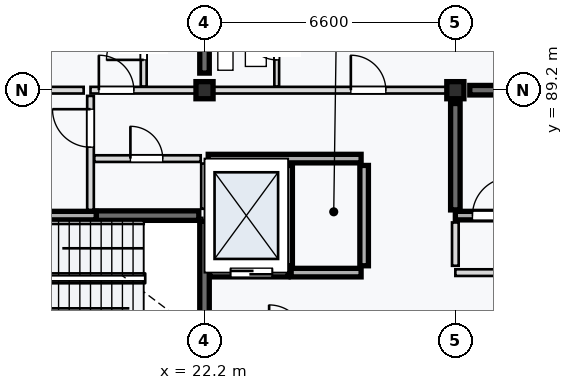
"""IFC4 building model, lengths in metres.
Left out: names, types, materials, properties, quantities, classifications, styles, units other than length and angle.
Written with IfcOpenShell. Run it as: python <this file> out.ifc"""

import sys

from ifc_helpers import new_model, si_unit, direction, frame, frame_2d, origin, origin_2d, place, context, subcontext, project, spatial, rectangle, extrude, element, fill, save


model = new_model("IFC4")
c1 = context("Model", 3, precision=1e-05, world=origin(), true_north=direction((0.0, 1.0)))
c2 = subcontext(c1, "Body", "Model", "MODEL_VIEW")
j1 = project(units=[si_unit("LENGTHUNIT", "METRE"), si_unit("PLANEANGLEUNIT", "RADIAN")], contexts=[c1])
p1 = place(None, origin())
s1 = spatial("IfcSite", under=j1, at=p1, CompositionType="ELEMENT")
p2 = place(p1, origin())
s2 = spatial("IfcBuilding", under=s1, at=p2, CompositionType="ELEMENT")
p3 = place(p2, frame((0.0, 0.0, 43.6)))
s3 = spatial("IfcBuildingStorey", under=s2, at=p3, CompositionType="ELEMENT", Elevation=43.6)
for number, where, z_axis, x_axis in (
    (1, (22.2, 89.2, 0.0), (0.0, 0.0, 1.0), (1.0, 0.0, 0.0)),
    (2, (28.8, 89.2, 0.0), (0.0, 0.0, 1.0), (1.0, 0.0, 0.0)),
):
    element("IfcColumn", number, at=place(p3, frame(where, z_axis=z_axis, x_axis=x_axis)), inside=s3, PredefinedType="COLUMN", context=c2, shape_type="SweptSolid", body=[
        extrude(rectangle(XDim=0.45, YDim=0.45, at=origin_2d()), origin(), (0.0, 0.0, 1.0), 3.2),
    ])
p4 = place(p3, frame((19.35, 85.9, 0.0), z_axis=(0.0, 0.0, 1.0), x_axis=(1.0, 0.0, 0.0)))
e3 = element("IfcWall", 3, at=p4, inside=s3, PredefinedType="SHEAR", context=c2, shape_type="SweptSolid", body=[
    extrude(rectangle(XDim=2.7, YDim=0.25, at=frame_2d((1.35, 0.0))), origin(), (0.0, 0.0, 1.0), 2.98),
])
p5 = place(p3, frame((22.2, 82.95, 0.0), z_axis=(0.0, 0.0, 1.0), x_axis=(0.0, 1.0, 0.0)))
e4 = element("IfcWall", 4, at=p5, inside=s3, PredefinedType="SHEAR", context=c2, shape_type="SweptSolid", body=[
    extrude(rectangle(XDim=2.8, YDim=0.25, at=frame_2d((1.4, 0.0))), origin(), (0.0, 0.0, 1.0), 2.98),
])
p6 = place(p3, frame((29.18, 89.2, 0.0), z_axis=(0.0, 0.0, 1.0), x_axis=(1.0, 0.0, 0.0)))
e5 = element("IfcWall", 5, at=p6, inside=s3, PredefinedType="SHEAR", context=c2, shape_type="SweptSolid", body=[
    extrude(rectangle(XDim=5.84, YDim=0.25, at=frame_2d((2.92, 0.0))), origin(), (0.0, 0.0, 1.0), 2.98),
])
p7 = place(p3, frame((28.8, 86.05, 0.0), z_axis=(0.0, 0.0, 1.0), x_axis=(0.0, 1.0, 0.0)))
e6 = element("IfcWall", 6, at=p7, inside=s3, PredefinedType="SHEAR", context=c2, shape_type="SweptSolid", body=[
    extrude(rectangle(XDim=2.8, YDim=0.25, at=frame_2d((1.4, 0.0))), origin(), (0.0, 0.0, 1.0), 2.98),
])
p8 = place(p3, frame((22.2, 89.65, 0.0), z_axis=(0.0, 0.0, 1.0), x_axis=(0.0, 1.0, 0.0)))
e7 = element("IfcWall", 7, at=p8, inside=s3, PredefinedType="SHEAR", context=c2, shape_type="SweptSolid", body=[
    extrude(rectangle(XDim=5.7, YDim=0.25, at=frame_2d((2.85, 0.0))), origin(), (0.0, 0.0, 1.0), 2.98),
])
p9 = place(p3, frame((15.75, 85.9, 0.0), z_axis=(0.0, 0.0, 1.0), x_axis=(1.0, 0.0, 0.0)))
e8 = element("IfcWall", 8, at=p9, inside=s3, PredefinedType="STANDARD", context=c2, shape_type="SweptSolid", body=[
    extrude(rectangle(XDim=3.6, YDim=0.225, at=frame_2d((1.8, 0.0))), origin(), (0.0, 0.0, 1.0), 2.98),
])
p10 = place(p9, frame((0.45, 0.0, 0.0)))
e9 = element("IfcOpeningElement", 9, at=p10, cuts=e8, PredefinedType="OPENING", context=c2, shape_type="SweptSolid", body=[
    extrude(rectangle(XDim=1.0, YDim=2.1, at=frame_2d((0.5, 1.05))), frame((0.0, 0.123, 0.0), z_axis=(0.0, -1.0, 0.0), x_axis=(1.0, 0.0, 0.0)), (0.0, 0.0, 1.0), 0.245),
])
p11 = place(p3, frame((19.2, 86.05, 0.0), z_axis=(0.0, 0.0, 1.0), x_axis=(0.0, 1.0, 0.0)))
e10 = element("IfcWall", 10, at=p11, inside=s3, PredefinedType="PARTITIONING", context=c2, shape_type="SweptSolid", body=[
    extrude(rectangle(XDim=3.0, YDim=0.175, at=frame_2d((1.5, 0.0))), origin(), (0.0, 0.0, 1.0), 2.98),
])
p12 = place(p11, frame((1.65, 0.0, 0.0)))
e11 = element("IfcOpeningElement", 11, at=p12, cuts=e10, PredefinedType="OPENING", context=c2, shape_type="SweptSolid", body=[
    extrude(rectangle(XDim=1.0, YDim=2.16, at=frame_2d((0.5, 1.08))), frame((0.0, 0.097, 0.0), z_axis=(0.0, -1.0, 0.0), x_axis=(1.0, 0.0, 0.0)), (0.0, 0.0, 1.0), 0.195),
])
p13 = place(p3, frame((19.3, 87.4, 0.0), z_axis=(0.0, 0.0, 1.0), x_axis=(1.0, 0.0, 0.0)))
e12 = element("IfcWall", 12, at=p13, inside=s3, PredefinedType="PARTITIONING", context=c2, shape_type="SweptSolid", body=[
    extrude(rectangle(XDim=2.8, YDim=0.175, at=frame_2d((1.4, 0.0))), origin(), (0.0, 0.0, 1.0), 2.98),
])
p14 = place(p13, frame((0.95, 0.0, 0.0)))
e13 = element("IfcOpeningElement", 13, at=p14, cuts=e12, PredefinedType="OPENING", context=c2, shape_type="SweptSolid", body=[
    extrude(rectangle(XDim=0.85, YDim=2.0, at=frame_2d((0.425, 1.0))), frame((0.0, 0.097, 0.0), z_axis=(0.0, -1.0, 0.0), x_axis=(1.0, 0.0, 0.0)), (0.0, 0.0, 1.0), 0.195),
])
p15 = place(p3, frame((22.2, 86.08, 0.0), z_axis=(0.0, 0.0, 1.0), x_axis=(0.0, 1.0, 0.0)))
e14 = element("IfcWall", 14, at=p15, inside=s3, PredefinedType="PARTITIONING", context=c2, shape_type="SweptSolid", body=[
    extrude(rectangle(XDim=1.19, YDim=0.175, at=frame_2d((0.595, 0.0))), origin(), (0.0, 0.0, 1.0), 2.98),
])
p16 = place(p3, frame((22.335, 84.4, 0.0), z_axis=(0.0, 0.0, 1.0), x_axis=(1.0, 0.0, 0.0)))
e15 = element("IfcWall", 15, at=p16, inside=s3, PredefinedType="STANDARD", context=c2, shape_type="SweptSolid", body=[
    extrude(rectangle(XDim=2.065, YDim=0.225, at=frame_2d((1.032, 0.0))), origin(), (0.0, 0.0, 1.0), 2.98),
])
p17 = place(p16, frame((0.55, 0.0, 0.0)))
e16 = element("IfcOpeningElement", 16, at=p17, cuts=e15, PredefinedType="OPENING", context=c2, shape_type="SweptSolid", body=[
    extrude(rectangle(XDim=1.1, YDim=2.1, at=frame_2d((0.55, 1.05))), frame((0.0, 0.123, 0.0), z_axis=(0.0, -1.0, 0.0), x_axis=(1.0, 0.0, 0.0)), (0.0, 0.0, 1.0), 0.245),
])
p18 = place(p3, frame((24.48, 84.4, 0.0), z_axis=(0.0, 0.0, 1.0), x_axis=(1.0, 0.0, 0.0)))
e17 = element("IfcWall", 17, at=p18, inside=s3, PredefinedType="STANDARD", context=c2, shape_type="SweptSolid", body=[
    extrude(rectangle(XDim=1.84, YDim=0.225, at=frame_2d((0.92, 0.0))), origin(), (0.0, 0.0, 1.0), 2.98),
])
p19 = place(p3, frame((22.298, 87.4, 0.0), z_axis=(0.0, 0.0, 1.0), x_axis=(1.0, 0.0, 0.0)))
e18 = element("IfcWall", 18, at=p19, inside=s3, PredefinedType="STANDARD", context=c2, shape_type="SweptSolid", body=[
    extrude(rectangle(XDim=4.022, YDim=0.225, at=frame_2d((2.011, 0.0))), origin(), (0.0, 0.0, 1.0), 2.98),
])
for number, where, z_axis, x_axis in (
    (19, (24.4, 84.58, 0.0), (0.0, 0.0, 1.0), (0.0, 1.0, 0.0)),
    (20, (26.4, 84.58, 0.0), (0.0, 0.0, 1.0), (0.0, 1.0, 0.0)),
):
    element("IfcWall", number, at=place(p3, frame(where, z_axis=z_axis, x_axis=x_axis)), inside=s3, PredefinedType="STANDARD", context=c2, shape_type="SweptSolid", body=[
        extrude(rectangle(XDim=2.64, YDim=0.225, at=frame_2d((1.32, 0.0))), origin(), (0.0, 0.0, 1.0), 2.98),
    ])
p20 = place(p3, frame((28.8, 85.9, 0.0), z_axis=(0.0, 0.0, 1.0), x_axis=(1.0, 0.0, 0.0)))
e21 = element("IfcWall", 21, at=p20, inside=s3, PredefinedType="STANDARD", context=c2, shape_type="SweptSolid", body=[
    extrude(rectangle(XDim=3.45, YDim=0.225, at=frame_2d((1.725, 0.0))), origin(), (0.0, 0.0, 1.0), 2.98),
])
p21 = place(p20, frame((0.45, 0.0, 0.0)))
e22 = element("IfcOpeningElement", 22, at=p21, cuts=e21, PredefinedType="OPENING", context=c2, shape_type="SweptSolid", body=[
    extrude(rectangle(XDim=1.0, YDim=2.16, at=frame_2d((0.5, 1.08))), frame((0.0, 0.123, 0.0), z_axis=(0.0, -1.0, 0.0), x_axis=(1.0, 0.0, 0.0)), (0.0, 0.0, 1.0), 0.245),
])
p22 = place(p3, frame((28.8, 84.4, 0.0), z_axis=(0.0, 0.0, 1.0), x_axis=(1.0, 0.0, 0.0)))
e23 = element("IfcWall", 23, at=p22, inside=s3, PredefinedType="PARTITIONING", context=c2, shape_type="SweptSolid", body=[
    extrude(rectangle(XDim=3.3, YDim=0.175, at=frame_2d((1.65, 0.0))), origin(), (0.0, 0.0, 1.0), 2.98),
])
p23 = place(p22, frame((1.8, 0.0, 0.0)))
e24 = element("IfcOpeningElement", 24, at=p23, cuts=e23, PredefinedType="OPENING", context=c2, shape_type="SweptSolid", body=[
    extrude(rectangle(XDim=1.04, YDim=2.12, at=frame_2d((0.52, 1.06))), frame((0.0, 0.097, 0.0), z_axis=(0.0, -1.0, 0.0), x_axis=(1.0, 0.0, 0.0)), (0.0, 0.0, 1.0), 0.195),
])
p24 = place(p3, frame((28.8, 84.58, 0.0), z_axis=(0.0, 0.0, 1.0), x_axis=(0.0, 1.0, 0.0)))
e25 = element("IfcWall", 25, at=p24, inside=s3, PredefinedType="PARTITIONING", context=c2, shape_type="SweptSolid", body=[
    extrude(rectangle(XDim=1.14, YDim=0.175, at=frame_2d((0.57, 0.0))), origin(), (0.0, 0.0, 1.0), 2.98),
])
p25 = place(p3, frame((15.88, 89.2, 0.0), z_axis=(0.0, 0.0, 1.0), x_axis=(1.0, 0.0, 0.0)))
e26 = element("IfcWall", 26, at=p25, inside=s3, PredefinedType="PARTITIONING", context=c2, shape_type="SweptSolid", body=[
    extrude(rectangle(XDim=3.14, YDim=0.175, at=frame_2d((1.57, 0.0))), origin(), (0.0, 0.0, 1.0), 2.7),
])
p26 = place(p3, frame((19.2, 89.2, 0.0), z_axis=(0.0, 0.0, 1.0), x_axis=(1.0, 0.0, 0.0)))
e27 = element("IfcWall", 27, at=p26, inside=s3, PredefinedType="PARTITIONING", context=c2, shape_type="SweptSolid", body=[
    extrude(rectangle(XDim=3.0, YDim=0.175, at=frame_2d((1.5, 0.0))), origin(), (0.0, 0.0, 1.0), 2.7),
])
p27 = place(p26, frame((0.22, 0.0, 0.0)))
e28 = element("IfcOpeningElement", 28, at=p27, cuts=e27, PredefinedType="OPENING", context=c2, shape_type="SweptSolid", body=[
    extrude(rectangle(XDim=0.92, YDim=2.14, at=frame_2d((0.46, 1.07))), frame((0.0, 0.097, 0.0), z_axis=(0.0, -1.0, 0.0), x_axis=(1.0, 0.0, 0.0)), (0.0, 0.0, 1.0), 0.195),
])
p28 = place(p3, frame((20.6, 89.298, 0.0), z_axis=(0.0, 0.0, 1.0), x_axis=(0.0, 1.0, 0.0)))
e29 = element("IfcWall", 29, at=p28, inside=s3, PredefinedType="PARTITIONING", context=c2, shape_type="SweptSolid", body=[
    extrude(rectangle(XDim=2.302, YDim=0.155, at=frame_2d((1.151, 0.0))), origin(), (0.0, 0.0, 1.0), 2.98),
])
p29 = place(p28, frame((0.7, 0.0, 0.0)))
e30 = element("IfcOpeningElement", 30, at=p29, cuts=e29, PredefinedType="OPENING", context=c2, shape_type="SweptSolid", body=[
    extrude(rectangle(XDim=0.98, YDim=2.12, at=frame_2d((0.49, 1.06))), frame((0.0, 0.087, 0.0), z_axis=(0.0, -1.0, 0.0), x_axis=(1.0, 0.0, 0.0)), (0.0, 0.0, 1.0), 0.175),
])
p30 = place(p3, frame((22.2, 89.2, 0.0), z_axis=(0.0, 0.0, 1.0), x_axis=(1.0, 0.0, 0.0)))
e31 = element("IfcWall", 31, at=p30, inside=s3, PredefinedType="PARTITIONING", context=c2, shape_type="SweptSolid", body=[
    extrude(rectangle(XDim=6.6, YDim=0.175, at=frame_2d((3.3, 0.0))), origin(), (0.0, 0.0, 1.0), 2.7),
])
p31 = place(p30, frame((3.85, 0.0, 0.0)))
e32 = element("IfcOpeningElement", 32, at=p31, cuts=e31, PredefinedType="OPENING", context=c2, shape_type="SweptSolid", body=[
    extrude(rectangle(XDim=0.92, YDim=2.14, at=frame_2d((0.46, 1.07))), frame((0.0, 0.097, 0.0), z_axis=(0.0, -1.0, 0.0), x_axis=(1.0, 0.0, 0.0)), (0.0, 0.0, 1.0), 0.195),
])
p32 = place(p3, frame((24.1, 89.298, 0.0), z_axis=(0.0, 0.0, 1.0), x_axis=(0.0, 1.0, 0.0)))
e33 = element("IfcWall", 33, at=p32, inside=s3, PredefinedType="PARTITIONING", context=c2, shape_type="SweptSolid", body=[
    extrude(rectangle(XDim=2.302, YDim=0.125, at=frame_2d((1.151, 0.0))), origin(), (0.0, 0.0, 1.0), 2.98),
])
p33 = place(p32, frame((0.7, 0.0, 0.0)))
e34 = element("IfcOpeningElement", 34, at=p33, cuts=e33, PredefinedType="OPENING", context=c2, shape_type="SweptSolid", body=[
    extrude(rectangle(XDim=0.82, YDim=2.05, at=frame_2d((0.41, 1.025))), frame((0.0, 0.073, 0.0), z_axis=(0.0, -1.0, 0.0), x_axis=(1.0, 0.0, 0.0)), (0.0, 0.0, 1.0), 0.145),
])
p34 = place(p12, origin())
e35 = element("IfcDoor", 35, at=p34, inside=s3, OperationType="SINGLE_SWING_RIGHT", PredefinedType="DOOR", context=c2, shape_type="SweptSolid", body=[
    extrude(rectangle(XDim=1.0, YDim=2.16, at=frame_2d((0.5, 1.08))), frame((0.0, 0.025, 0.0), z_axis=(0.0, -1.0, 0.0), x_axis=(1.0, 0.0, 0.0)), (0.0, 0.0, 1.0), 0.05),
])
fill(e11, e35)
p35 = place(p14, origin())
e36 = element("IfcDoor", 36, at=p35, inside=s3, OperationType="SINGLE_SWING_LEFT", PredefinedType="DOOR", context=c2, shape_type="SweptSolid", body=[
    extrude(rectangle(XDim=0.85, YDim=2.0, at=frame_2d((0.425, 1.0))), frame((0.0, 0.025, 0.0), z_axis=(0.0, -1.0, 0.0), x_axis=(1.0, 0.0, 0.0)), (0.0, 0.0, 1.0), 0.05),
])
fill(e13, e36)
p36 = place(p17, origin())
e37 = element("IfcDoor", 37, at=p36, inside=s3, OperationType="DOUBLE_DOOR_SLIDING", PredefinedType="DOOR", context=c2, shape_type="SweptSolid", body=[
    extrude(rectangle(XDim=1.1, YDim=2.1, at=frame_2d((0.55, 1.05))), frame((0.0, 0.025, 0.0), z_axis=(0.0, -1.0, 0.0), x_axis=(1.0, 0.0, 0.0)), (0.0, 0.0, 1.0), 0.05),
])
fill(e16, e37)
p37 = place(p21, origin())
e38 = element("IfcDoor", 38, at=p37, inside=s3, OperationType="SINGLE_SWING_RIGHT", PredefinedType="DOOR", context=c2, shape_type="SweptSolid", body=[
    extrude(rectangle(XDim=1.0, YDim=2.16, at=frame_2d((0.5, 1.08))), frame((0.0, 0.025, 0.0), z_axis=(0.0, -1.0, 0.0), x_axis=(1.0, 0.0, 0.0)), (0.0, 0.0, 1.0), 0.05),
])
fill(e22, e38)
p38 = place(p27, origin())
e39 = element("IfcDoor", 39, at=p38, inside=s3, OperationType="SINGLE_SWING_LEFT", PredefinedType="DOOR", context=c2, shape_type="SweptSolid", body=[
    extrude(rectangle(XDim=0.92, YDim=2.14, at=frame_2d((0.46, 1.07))), frame((0.0, 0.025, 0.0), z_axis=(0.0, -1.0, 0.0), x_axis=(1.0, 0.0, 0.0)), (0.0, 0.0, 1.0), 0.05),
])
fill(e28, e39)
p39 = place(p29, origin())
e40 = element("IfcDoor", 40, at=p39, inside=s3, OperationType="SINGLE_SWING_LEFT", PredefinedType="DOOR", context=c2, shape_type="SweptSolid", body=[
    extrude(rectangle(XDim=0.98, YDim=2.12, at=frame_2d((0.49, 1.06))), frame((0.0, 0.025, 0.0), z_axis=(0.0, -1.0, 0.0), x_axis=(1.0, 0.0, 0.0)), (0.0, 0.0, 1.0), 0.05),
])
fill(e30, e40)
p40 = place(p31, origin())
e41 = element("IfcDoor", 41, at=p40, inside=s3, OperationType="SINGLE_SWING_LEFT", PredefinedType="DOOR", context=c2, shape_type="SweptSolid", body=[
    extrude(rectangle(XDim=0.92, YDim=2.14, at=frame_2d((0.46, 1.07))), frame((0.0, 0.025, 0.0), z_axis=(0.0, -1.0, 0.0), x_axis=(1.0, 0.0, 0.0)), (0.0, 0.0, 1.0), 0.05),
])
fill(e32, e41)
p41 = place(p33, origin())
e42 = element("IfcDoor", 42, at=p41, inside=s3, OperationType="SINGLE_SWING_RIGHT", PredefinedType="DOOR", context=c2, shape_type="SweptSolid", body=[
    extrude(rectangle(XDim=0.82, YDim=2.05, at=frame_2d((0.41, 1.025))), frame((0.0, 0.025, 0.0), z_axis=(0.0, -1.0, 0.0), x_axis=(1.0, 0.0, 0.0)), (0.0, 0.0, 1.0), 0.05),
])
fill(e34, e42)
save(model, sys.argv[1])
